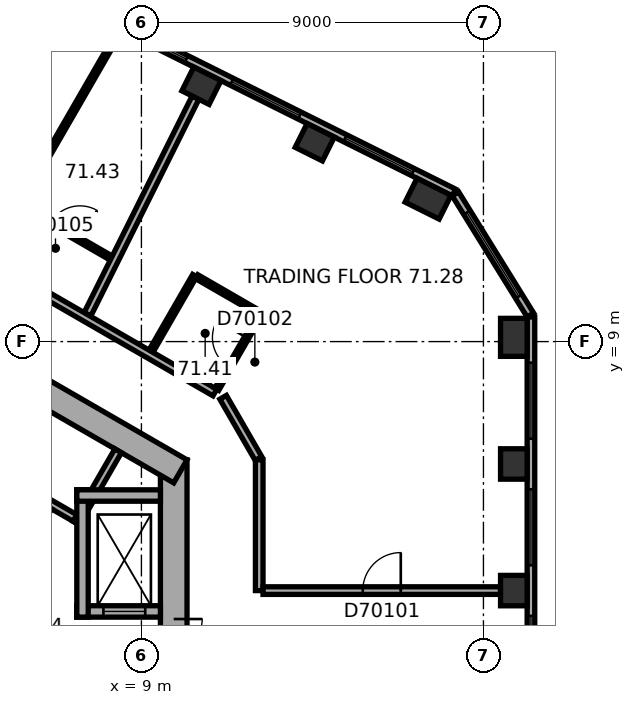
"""IFC4 building model, lengths in metres.
Left out: names, types, materials, properties, quantities, classifications, styles, units other than length and angle.
Written with IfcOpenShell. Run it as: python <this file> out.ifc"""

import sys

from ifc_helpers import new_model, si_unit, direction, frame, frame_2d, origin, origin_2d, place, context, subcontext, project, spatial, rectangle, extrude, element, fill, save


model = new_model("IFC4")
c1 = context("Model", 3, precision=1e-05, world=origin(), true_north=direction((0.0, 1.0)))
c2 = subcontext(c1, "Body", "Model", "MODEL_VIEW")
j1 = project(units=[si_unit("LENGTHUNIT", "METRE"), si_unit("PLANEANGLEUNIT", "RADIAN")], contexts=[c1])
p1 = place(None, origin())
s1 = spatial("IfcSite", under=j1, at=p1, CompositionType="ELEMENT")
p2 = place(p1, origin())
s2 = spatial("IfcBuilding", under=s1, at=p2, CompositionType="ELEMENT")
p3 = place(p2, frame((0.0, 0.0, 289.4)))
s3 = spatial("IfcBuildingStorey", under=s2, at=p3, CompositionType="ELEMENT", Elevation=289.4)
for number, where, z_axis, x_axis in (
    (1, (18.8, 2.448, 0.0), (0.0, 0.0, 1.0), (0.0, 1.0, 0.0)),
    (2, (18.8, 5.78, 0.0), (0.0, 0.0, 1.0), (0.0, 1.0, 0.0)),
):
    element("IfcColumn", number, at=place(p3, frame(where, z_axis=z_axis, x_axis=x_axis)), inside=s3, PredefinedType="COLUMN", context=c2, shape_type="SweptSolid", body=[
        extrude(rectangle(XDim=0.8, YDim=0.7, at=origin_2d()), origin(), (0.0, 0.0, 1.0), 3.7),
    ])
for number, where, z_axis, x_axis in (
    (3, (18.8, 9.112, 0.0), (0.0, 0.0, 1.0), (0.0, 1.0, 0.0)),
    (4, (16.543, 12.759, 0.0), (0.0, 0.0, 1.0), (-0.895, 0.446, 0.0)),
):
    element("IfcColumn", number, at=place(p3, frame(where, z_axis=z_axis, x_axis=x_axis)), inside=s3, PredefinedType="COLUMN", context=c2, shape_type="SweptSolid", body=[
        extrude(rectangle(XDim=1.0, YDim=0.7, at=origin_2d()), origin(), (0.0, 0.0, 1.0), 3.7),
    ])
for number, where, z_axis, x_axis in (
    (5, (13.561, 14.246, 0.0), (0.0, 0.0, 1.0), (-0.895, 0.446, 0.0)),
    (6, (10.58, 15.732, 0.0), (0.0, 0.0, 1.0), (-0.895, 0.446, 0.0)),
):
    element("IfcColumn", number, at=place(p3, frame(where, z_axis=z_axis, x_axis=x_axis)), inside=s3, PredefinedType="COLUMN", context=c2, shape_type="SweptSolid", body=[
        extrude(rectangle(XDim=0.8, YDim=0.7, at=origin_2d()), origin(), (0.0, 0.0, 1.0), 3.7),
    ])
p4 = place(p3, frame((9.85, -5.889, 0.0), z_axis=(0.0, 0.0, 1.0), x_axis=(0.0, 1.0, 0.0)))
e7 = element("IfcWall", 7, at=p4, inside=s3, PredefinedType="SHEAR", context=c2, shape_type="SweptSolid", body=[
    extrude(rectangle(XDim=11.778, YDim=0.7, at=frame_2d((5.889, 0.0))), origin(), (0.0, 0.0, 1.0), 3.7),
])
p5 = place(p4, frame((6.089, 0.0, 0.0)))
e8 = element("IfcOpeningElement", 8, at=p5, cuts=e7, PredefinedType="OPENING", context=c2, shape_type="SweptSolid", body=[
    extrude(rectangle(XDim=1.5, YDim=2.1, at=frame_2d((0.75, 1.05))), frame((0.0, 0.36, 0.0), z_axis=(0.0, -1.0, 0.0), x_axis=(1.0, 0.0, 0.0)), (0.0, 0.0, 1.0), 0.72),
])
p6 = place(p4, frame((2.939, 0.0, 0.0)))
e9 = element("IfcOpeningElement", 9, at=p6, cuts=e7, PredefinedType="OPENING", context=c2, shape_type="SweptSolid", body=[
    extrude(rectangle(XDim=0.9, YDim=2.1, at=frame_2d((0.45, 1.05))), frame((0.0, 0.36, 0.0), z_axis=(0.0, -1.0, 0.0), x_axis=(1.0, 0.0, 0.0)), (0.0, 0.0, 1.0), 0.72),
])
p7 = place(p3, frame((10.025, 5.586, 0.0), z_axis=(0.0, 0.0, 1.0), x_axis=(-0.866026453023, 0.499998182661, 0.0)))
e10 = element("IfcWall", 10, at=p7, inside=s3, PredefinedType="SHEAR", context=c2, shape_type="SweptSolid", body=[
    extrude(rectangle(XDim=11.778, YDim=0.7, at=frame_2d((5.889, 0.0))), origin(), (0.0, 0.0, 1.0), 3.7),
])
p8 = place(p7, frame((5.139, 0.0, 0.0)))
e11 = element("IfcOpeningElement", 11, at=p8, cuts=e10, PredefinedType="OPENING", context=c2, shape_type="SweptSolid", body=[
    extrude(rectangle(XDim=0.9, YDim=2.1, at=frame_2d((0.45, 1.05))), frame((0.0, 0.36, 0.0), z_axis=(0.0, -1.0, 0.0), x_axis=(1.0, 0.0, 0.0)), (0.0, 0.0, 1.0), 0.72),
])
p9 = place(p3, frame((19.25, -8.084, 0.0), z_axis=(0.0, 0.0, 1.0), x_axis=(0.0, 1.0, 0.0)))
e12 = element("IfcWall", 12, at=p9, inside=s3, PredefinedType="STANDARD", context=c2, shape_type="SweptSolid", body=[
    extrude(rectangle(XDim=17.731, YDim=0.2, at=frame_2d((8.866, 0.0))), origin(), (0.0, 0.0, 1.0), 3.7),
])
p10 = place(p9, frame((1.203, 0.0, 0.9)))
e13 = element("IfcOpeningElement", 13, at=p10, cuts=e12, PredefinedType="OPENING", context=c2, shape_type="SweptSolid", body=[
    extrude(rectangle(XDim=2.0, YDim=2.0, at=frame_2d((1.0, 1.0))), frame((0.0, 0.11, 0.0), z_axis=(0.0, -1.0, 0.0), x_axis=(1.0, 0.0, 0.0)), (0.0, 0.0, 1.0), 0.22),
])
p11 = place(p9, frame((4.535, 0.0, 0.9)))
e14 = element("IfcOpeningElement", 14, at=p11, cuts=e12, PredefinedType="OPENING", context=c2, shape_type="SweptSolid", body=[
    extrude(rectangle(XDim=2.0, YDim=2.0, at=frame_2d((1.0, 1.0))), frame((0.0, 0.11, 0.0), z_axis=(0.0, -1.0, 0.0), x_axis=(1.0, 0.0, 0.0)), (0.0, 0.0, 1.0), 0.22),
])
p12 = place(p9, frame((7.866, 0.0, 0.9)))
e15 = element("IfcOpeningElement", 15, at=p12, cuts=e12, PredefinedType="OPENING", context=c2, shape_type="SweptSolid", body=[
    extrude(rectangle(XDim=2.0, YDim=2.0, at=frame_2d((1.0, 1.0))), frame((0.0, 0.11, 0.0), z_axis=(0.0, -1.0, 0.0), x_axis=(1.0, 0.0, 0.0)), (0.0, 0.0, 1.0), 0.22),
])
p13 = place(p9, frame((11.198, 0.0, 0.9)))
e16 = element("IfcOpeningElement", 16, at=p13, cuts=e12, PredefinedType="OPENING", context=c2, shape_type="SweptSolid", body=[
    extrude(rectangle(XDim=2.0, YDim=2.0, at=frame_2d((1.0, 1.0))), frame((0.0, 0.11, 0.0), z_axis=(0.0, -1.0, 0.0), x_axis=(1.0, 0.0, 0.0)), (0.0, 0.0, 1.0), 0.22),
])
p14 = place(p9, frame((14.53, 0.0, 0.9)))
e17 = element("IfcOpeningElement", 17, at=p14, cuts=e12, PredefinedType="OPENING", context=c2, shape_type="SweptSolid", body=[
    extrude(rectangle(XDim=2.0, YDim=2.0, at=frame_2d((1.0, 1.0))), frame((0.0, 0.11, 0.0), z_axis=(0.0, -1.0, 0.0), x_axis=(1.0, 0.0, 0.0)), (0.0, 0.0, 1.0), 0.22),
])
p15 = place(p3, frame((19.235, 9.7, 0.0), z_axis=(0.0, 0.0, 1.0), x_axis=(-0.526233475464, 0.850340125656, 0.0)))
e18 = element("IfcWall", 18, at=p15, inside=s3, PredefinedType="STANDARD", context=c2, shape_type="SweptSolid", body=[
    extrude(rectangle(XDim=3.747, YDim=0.2, at=frame_2d((1.874, 0.0))), origin(), (0.0, 0.0, 1.0), 3.7),
])
p16 = place(p15, frame((0.573, 0.0, 0.9)))
e19 = element("IfcOpeningElement", 19, at=p16, cuts=e18, PredefinedType="OPENING", context=c2, shape_type="SweptSolid", body=[
    extrude(rectangle(XDim=2.6, YDim=2.0, at=frame_2d((1.3, 1.0))), frame((0.0, 0.11, 0.0), z_axis=(0.0, -1.0, 0.0), x_axis=(1.0, 0.0, 0.0)), (0.0, 0.0, 1.0), 0.22),
])
p17 = place(p3, frame((17.223, 12.923, 0.0), z_axis=(0.0, 0.0, 1.0), x_axis=(-0.894930561148, 0.44620543556, 0.0)))
e20 = element("IfcWall", 20, at=p17, inside=s3, PredefinedType="STANDARD", context=c2, shape_type="SweptSolid", body=[
    extrude(rectangle(XDim=17.731, YDim=0.2, at=frame_2d((8.866, 0.0))), origin(), (0.0, 0.0, 1.0), 3.7),
])
p18 = place(p17, frame((1.202, 0.0, 0.9)))
e21 = element("IfcOpeningElement", 21, at=p18, cuts=e20, PredefinedType="OPENING", context=c2, shape_type="SweptSolid", body=[
    extrude(rectangle(XDim=2.0, YDim=2.0, at=frame_2d((1.0, 1.0))), frame((0.0, 0.11, 0.0), z_axis=(0.0, -1.0, 0.0), x_axis=(1.0, 0.0, 0.0)), (0.0, 0.0, 1.0), 0.22),
])
p19 = place(p17, frame((4.533, 0.0, 0.9)))
e22 = element("IfcOpeningElement", 22, at=p19, cuts=e20, PredefinedType="OPENING", context=c2, shape_type="SweptSolid", body=[
    extrude(rectangle(XDim=2.0, YDim=2.0, at=frame_2d((1.0, 1.0))), frame((0.0, 0.11, 0.0), z_axis=(0.0, -1.0, 0.0), x_axis=(1.0, 0.0, 0.0)), (0.0, 0.0, 1.0), 0.22),
])
p20 = place(p17, frame((7.865, 0.0, 0.9)))
e23 = element("IfcOpeningElement", 23, at=p20, cuts=e20, PredefinedType="OPENING", context=c2, shape_type="SweptSolid", body=[
    extrude(rectangle(XDim=2.0, YDim=2.0, at=frame_2d((1.0, 1.0))), frame((0.0, 0.11, 0.0), z_axis=(0.0, -1.0, 0.0), x_axis=(1.0, 0.0, 0.0)), (0.0, 0.0, 1.0), 0.22),
])
p21 = place(p17, frame((11.197, 0.0, 0.9)))
e24 = element("IfcOpeningElement", 24, at=p21, cuts=e20, PredefinedType="OPENING", context=c2, shape_type="SweptSolid", body=[
    extrude(rectangle(XDim=2.0, YDim=2.0, at=frame_2d((1.0, 1.0))), frame((0.0, 0.11, 0.0), z_axis=(0.0, -1.0, 0.0), x_axis=(1.0, 0.0, 0.0)), (0.0, 0.0, 1.0), 0.22),
])
p22 = place(p17, frame((14.528, 0.0, 0.9)))
e25 = element("IfcOpeningElement", 25, at=p22, cuts=e20, PredefinedType="OPENING", context=c2, shape_type="SweptSolid", body=[
    extrude(rectangle(XDim=2.0, YDim=2.0, at=frame_2d((1.0, 1.0))), frame((0.0, 0.11, 0.0), z_axis=(0.0, -1.0, 0.0), x_axis=(1.0, 0.0, 0.0)), (0.0, 0.0, 1.0), 0.22),
])
p23 = place(p3, frame((7.424, 4.259, 0.0), z_axis=(0.0, 0.0, 1.0), x_axis=(-0.866026010844, 0.49999894854, 0.0)))
e26 = element("IfcWall", 26, at=p23, inside=s3, PredefinedType="PARTITIONING", context=c2, shape_type="SweptSolid", body=[
    extrude(rectangle(XDim=8.0, YDim=0.2, at=frame_2d((4.0, 0.0))), origin(), (0.0, 0.0, 1.0), 3.42),
])
p24 = place(p3, frame((7.287, 4.222, 0.0), z_axis=(0.0, 0.0, 1.0), x_axis=(0.499946605688, 0.86605622881, 0.0)))
e27 = element("IfcWall", 27, at=p24, inside=s3, PredefinedType="PARTITIONING", context=c2, shape_type="SweptSolid", body=[
    extrude(rectangle(XDim=2.2, YDim=0.2, at=frame_2d((1.1, 0.0))), origin(), (0.0, 0.0, 1.0), 3.42),
])
p25 = place(p3, frame((7.3, 1.9, 0.0), z_axis=(0.0, 0.0, 1.0), x_axis=(1.0, 0.0, 0.0)))
e28 = element("IfcWall", 28, at=p25, inside=s3, PredefinedType="SHEAR", context=c2, shape_type="SweptSolid", body=[
    extrude(rectangle(XDim=2.2, YDim=0.3, at=frame_2d((1.1, 0.0))), origin(), (0.0, 0.0, 1.0), 3.42),
])
p26 = place(p25, frame((0.7, 0.0, 0.0)))
e29 = element("IfcOpeningElement", 29, at=p26, cuts=e28, PredefinedType="OPENING", context=c2, shape_type="SweptSolid", body=[
    extrude(rectangle(XDim=1.1, YDim=2.1, at=frame_2d((0.55, 1.05))), frame((0.0, 0.16, 0.0), z_axis=(0.0, -1.0, 0.0), x_axis=(1.0, 0.0, 0.0)), (0.0, 0.0, 1.0), 0.32),
])
p27 = place(p3, frame((7.45, 1.75, 0.0), z_axis=(0.0, 0.0, 1.0), x_axis=(0.0, 1.0, 0.0)))
e30 = element("IfcWall", 30, at=p27, inside=s3, PredefinedType="SHEAR", context=c2, shape_type="SweptSolid", body=[
    extrude(rectangle(XDim=3.35, YDim=0.3, at=frame_2d((1.675, 0.0))), origin(), (0.0, 0.0, 1.0), 3.42),
])
p28 = place(p3, frame((7.3, 4.95, 0.0), z_axis=(0.0, 0.0, 1.0), x_axis=(1.0, 0.0, 0.0)))
e31 = element("IfcWall", 31, at=p28, inside=s3, PredefinedType="SHEAR", context=c2, shape_type="SweptSolid", body=[
    extrude(rectangle(XDim=2.2, YDim=0.3, at=frame_2d((1.1, 0.0))), origin(), (0.0, 0.0, 1.0), 3.42),
])
p29 = place(p3, frame((8.207, 11.197, 0.0), z_axis=(0.0, 0.0, 1.0), x_axis=(-0.866030514021, 0.499991148707, 0.0)))
e32 = element("IfcWall", 32, at=p29, inside=s3, PredefinedType="PARTITIONING", context=c2, shape_type="SweptSolid", body=[
    extrude(rectangle(XDim=6.476, YDim=0.12, at=frame_2d((3.238, 0.0))), origin(), (0.0, 0.0, 1.0), 3.42),
])
p30 = place(p29, frame((5.011, 0.0, 0.0)))
e33 = element("IfcOpeningElement", 33, at=p30, cuts=e32, PredefinedType="OPENING", context=c2, shape_type="SweptSolid", body=[
    extrude(rectangle(XDim=1.0, YDim=2.1, at=frame_2d((0.5, 1.05))), frame((0.0, 0.07, 0.0), z_axis=(0.0, -1.0, 0.0), x_axis=(1.0, 0.0, 0.0)), (0.0, 0.0, 1.0), 0.14),
])
p31 = place(p29, frame((0.95, 0.0, 0.0)))
e34 = element("IfcOpeningElement", 34, at=p31, cuts=e32, PredefinedType="OPENING", context=c2, shape_type="SweptSolid", body=[
    extrude(rectangle(XDim=0.9, YDim=2.1, at=frame_2d((0.45, 1.05))), frame((0.0, 0.07, 0.0), z_axis=(0.0, -1.0, 0.0), x_axis=(1.0, 0.0, 0.0)), (0.0, 0.0, 1.0), 0.14),
])
p32 = place(p29, frame((3.223, 0.0, 0.0)))
e35 = element("IfcOpeningElement", 35, at=p32, cuts=e32, PredefinedType="OPENING", context=c2, shape_type="SweptSolid", body=[
    extrude(rectangle(XDim=0.9, YDim=2.1, at=frame_2d((0.45, 1.05))), frame((0.0, 0.07, 0.0), z_axis=(0.0, -1.0, 0.0), x_axis=(1.0, 0.0, 0.0)), (0.0, 0.0, 1.0), 0.14),
])
p33 = place(p3, frame((8.435, 17.192, 0.0), z_axis=(0.0, 0.0, 1.0), x_axis=(-0.499982949935, -0.86603524742, 0.0)))
e36 = element("IfcWall", 36, at=p33, inside=s3, PredefinedType="PARTITIONING", context=c2, shape_type="SweptSolid", body=[
    extrude(rectangle(XDim=5.246, YDim=0.12, at=frame_2d((2.623, 0.0))), origin(), (0.0, 0.0, 1.0), 3.42),
])
p34 = place(p3, frame((9.251, 8.746, 0.0), z_axis=(0.0, 0.0, 1.0), x_axis=(0.499998129301, 0.86602648383, 0.0)))
e37 = element("IfcWall", 37, at=p34, inside=s3, PredefinedType="PARTITIONING", context=c2, shape_type="SweptSolid", body=[
    extrude(rectangle(XDim=2.3, YDim=0.12, at=frame_2d((1.15, 0.0))), origin(), (0.0, 0.0, 1.0), 3.42),
])
p35 = place(p3, frame((10.423, 15.419, 0.0), z_axis=(0.0, 0.0, 1.0), x_axis=(-0.446201045829, -0.89493274982, 0.0)))
e38 = element("IfcWall", 38, at=p35, inside=s3, PredefinedType="PARTITIONING", context=c2, shape_type="SweptSolid", body=[
    extrude(rectangle(XDim=6.367, YDim=0.2, at=frame_2d((3.184, 0.0))), origin(), (0.0, 0.0, 1.0), 2.87),
])
p36 = place(p3, frame((10.453, 10.708, 0.0), z_axis=(0.0, 0.0, 1.0), x_axis=(0.865988597889, -0.500063744262, 0.0)))
e39 = element("IfcWall", 39, at=p36, inside=s3, PredefinedType="PARTITIONING", context=c2, shape_type="SweptSolid", body=[
    extrude(rectangle(XDim=1.94, YDim=0.12, at=frame_2d((0.97, 0.0))), origin(), (0.0, 0.0, 1.0), 3.42),
])
p37 = place(p3, frame((10.934, 7.659, 0.0), z_axis=(0.0, 0.0, 1.0), x_axis=(-0.866030932647, 0.499990423607, 0.0)))
e40 = element("IfcWall", 40, at=p37, inside=s3, PredefinedType="PARTITIONING", context=c2, shape_type="SweptSolid", body=[
    extrude(rectangle(XDim=11.488, YDim=0.2, at=frame_2d((5.744, 0.0))), origin(), (0.0, 0.0, 1.0), 3.42),
])
p38 = place(p37, frame((6.764, 0.0, 0.0)))
e41 = element("IfcOpeningElement", 41, at=p38, cuts=e40, PredefinedType="OPENING", context=c2, shape_type="SweptSolid", body=[
    extrude(rectangle(XDim=1.0, YDim=2.1, at=frame_2d((0.5, 1.05))), frame((0.0, 0.11, 0.0), z_axis=(0.0, -1.0, 0.0), x_axis=(1.0, 0.0, 0.0)), (0.0, 0.0, 1.0), 0.22),
])
p39 = place(p3, frame((12.08, 5.924, 0.0), z_axis=(0.0, 0.0, 1.0), x_axis=(-0.500063286585, 0.865988862174, 0.0)))
e42 = element("IfcWall", 42, at=p39, inside=s3, PredefinedType="PARTITIONING", context=c2, shape_type="SweptSolid", body=[
    extrude(rectangle(XDim=1.86, YDim=0.2, at=frame_2d((0.93, 0.0))), origin(), (0.0, 0.0, 1.0), 3.42),
])
p40 = place(p3, frame((12.1, 2.448, 0.0), z_axis=(0.0, 0.0, 1.0), x_axis=(0.0, 1.0, 0.0)))
e43 = element("IfcWall", 43, at=p40, inside=s3, PredefinedType="PARTITIONING", context=c2, shape_type="SweptSolid", body=[
    extrude(rectangle(XDim=3.441, YDim=0.2, at=frame_2d((1.72, 0.0))), origin(), (0.0, 0.0, 1.0), 3.42),
])
p41 = place(p3, frame((12.104, 9.686, 0.0), z_axis=(0.0, 0.0, 1.0), x_axis=(-0.500077830873, -0.865980463445, 0.0)))
e44 = element("IfcWall", 44, at=p41, inside=s3, PredefinedType="PARTITIONING", context=c2, shape_type="SweptSolid", body=[
    extrude(rectangle(XDim=2.24, YDim=0.12, at=frame_2d((1.12, 0.0))), origin(), (0.0, 0.0, 1.0), 3.42),
])
p42 = place(p41, frame((0.67, 0.0, 0.0)))
e45 = element("IfcOpeningElement", 45, at=p42, cuts=e44, PredefinedType="OPENING", context=c2, shape_type="SweptSolid", body=[
    extrude(rectangle(XDim=0.9, YDim=2.1, at=frame_2d((0.45, 1.05))), frame((0.0, 0.07, 0.0), z_axis=(0.0, -1.0, 0.0), x_axis=(1.0, 0.0, 0.0)), (0.0, 0.0, 1.0), 0.14),
])
p43 = place(p3, frame((18.45, 2.448, 0.0), z_axis=(0.0, 0.0, 1.0), x_axis=(-1.0, 0.0, 0.0)))
e46 = element("IfcWall", 46, at=p43, inside=s3, PredefinedType="PARTITIONING", context=c2, shape_type="SweptSolid", body=[
    extrude(rectangle(XDim=6.25, YDim=0.2, at=frame_2d((3.125, 0.0))), origin(), (0.0, 0.0, 1.0), 3.42),
])
p44 = place(p43, frame((2.625, 0.0, 0.0)))
e47 = element("IfcOpeningElement", 47, at=p44, cuts=e46, PredefinedType="OPENING", context=c2, shape_type="SweptSolid", body=[
    extrude(rectangle(XDim=1.0, YDim=2.1, at=frame_2d((0.5, 1.05))), frame((0.0, 0.11, 0.0), z_axis=(0.0, -1.0, 0.0), x_axis=(1.0, 0.0, 0.0)), (0.0, 0.0, 1.0), 0.22),
])
p45 = place(p12, origin())
e48 = element("IfcWindow", 48, at=p45, inside=s3, PartitioningType="SINGLE_PANEL", PredefinedType="WINDOW", context=c2, shape_type="SweptSolid", body=[
    extrude(rectangle(XDim=2.0, YDim=2.0, at=frame_2d((1.0, 1.0))), frame((0.0, 0.03, 0.0), z_axis=(0.0, -1.0, 0.0), x_axis=(1.0, 0.0, 0.0)), (0.0, 0.0, 1.0), 0.06),
])
fill(e15, e48)
p46 = place(p13, origin())
e49 = element("IfcWindow", 49, at=p46, inside=s3, PartitioningType="SINGLE_PANEL", PredefinedType="WINDOW", context=c2, shape_type="SweptSolid", body=[
    extrude(rectangle(XDim=2.0, YDim=2.0, at=frame_2d((1.0, 1.0))), frame((0.0, 0.03, 0.0), z_axis=(0.0, -1.0, 0.0), x_axis=(1.0, 0.0, 0.0)), (0.0, 0.0, 1.0), 0.06),
])
fill(e16, e49)
p47 = place(p14, origin())
e50 = element("IfcWindow", 50, at=p47, inside=s3, PartitioningType="SINGLE_PANEL", PredefinedType="WINDOW", context=c2, shape_type="SweptSolid", body=[
    extrude(rectangle(XDim=2.0, YDim=2.0, at=frame_2d((1.0, 1.0))), frame((0.0, 0.03, 0.0), z_axis=(0.0, -1.0, 0.0), x_axis=(1.0, 0.0, 0.0)), (0.0, 0.0, 1.0), 0.06),
])
fill(e17, e50)
p48 = place(p16, origin())
e51 = element("IfcWindow", 51, at=p48, inside=s3, PartitioningType="SINGLE_PANEL", PredefinedType="WINDOW", context=c2, shape_type="SweptSolid", body=[
    extrude(rectangle(XDim=2.6, YDim=2.0, at=frame_2d((1.3, 1.0))), frame((0.0, 0.03, 0.0), z_axis=(0.0, -1.0, 0.0), x_axis=(1.0, 0.0, 0.0)), (0.0, 0.0, 1.0), 0.06),
])
fill(e19, e51)
p49 = place(p18, origin())
e52 = element("IfcWindow", 52, at=p49, inside=s3, PartitioningType="SINGLE_PANEL", PredefinedType="WINDOW", context=c2, shape_type="SweptSolid", body=[
    extrude(rectangle(XDim=2.0, YDim=2.0, at=frame_2d((1.0, 1.0))), frame((0.0, 0.03, 0.0), z_axis=(0.0, -1.0, 0.0), x_axis=(1.0, 0.0, 0.0)), (0.0, 0.0, 1.0), 0.06),
])
fill(e21, e52)
p50 = place(p19, origin())
e53 = element("IfcWindow", 53, at=p50, inside=s3, PartitioningType="SINGLE_PANEL", PredefinedType="WINDOW", context=c2, shape_type="SweptSolid", body=[
    extrude(rectangle(XDim=2.0, YDim=2.0, at=frame_2d((1.0, 1.0))), frame((0.0, 0.03, 0.0), z_axis=(0.0, -1.0, 0.0), x_axis=(1.0, 0.0, 0.0)), (0.0, 0.0, 1.0), 0.06),
])
fill(e22, e53)
p51 = place(p20, origin())
e54 = element("IfcWindow", 54, at=p51, inside=s3, PartitioningType="SINGLE_PANEL", PredefinedType="WINDOW", context=c2, shape_type="SweptSolid", body=[
    extrude(rectangle(XDim=2.0, YDim=2.0, at=frame_2d((1.0, 1.0))), frame((0.0, 0.03, 0.0), z_axis=(0.0, -1.0, 0.0), x_axis=(1.0, 0.0, 0.0)), (0.0, 0.0, 1.0), 0.06),
])
fill(e23, e54)
p52 = place(p5, origin())
e55 = element("IfcDoor", 55, at=p52, inside=s3, OperationType="DOUBLE_DOOR_SINGLE_SWING", PredefinedType="DOOR", context=c2, shape_type="SweptSolid", body=[
    extrude(rectangle(XDim=1.5, YDim=2.1, at=frame_2d((0.75, 1.05))), frame((0.0, 0.025, 0.0), z_axis=(0.0, -1.0, 0.0), x_axis=(1.0, 0.0, 0.0)), (0.0, 0.0, 1.0), 0.05),
])
fill(e8, e55)
p53 = place(p26, origin())
e56 = element("IfcDoor", 56, at=p53, inside=s3, OperationType="DOUBLE_DOOR_SLIDING", PredefinedType="DOOR", context=c2, shape_type="SweptSolid", body=[
    extrude(rectangle(XDim=1.1, YDim=2.1, at=frame_2d((0.55, 1.05))), frame((0.0, 0.025, 0.0), z_axis=(0.0, -1.0, 0.0), x_axis=(1.0, 0.0, 0.0)), (0.0, 0.0, 1.0), 0.05),
])
fill(e29, e56)
p54 = place(p44, origin())
e57 = element("IfcDoor", 57, at=p54, inside=s3, OperationType="SINGLE_SWING_LEFT", PredefinedType="DOOR", context=c2, shape_type="SweptSolid", body=[
    extrude(rectangle(XDim=1.0, YDim=2.1, at=frame_2d((0.5, 1.05))), frame((0.0, 0.025, 0.0), z_axis=(0.0, -1.0, 0.0), x_axis=(1.0, 0.0, 0.0)), (0.0, 0.0, 1.0), 0.05),
])
fill(e47, e57)
p55 = place(p42, origin())
e58 = element("IfcDoor", 58, at=p55, inside=s3, OperationType="SINGLE_SWING_LEFT", PredefinedType="DOOR", context=c2, shape_type="SweptSolid", body=[
    extrude(rectangle(XDim=0.9, YDim=2.1, at=frame_2d((0.45, 1.05))), frame((0.0, 0.025, 0.0), z_axis=(0.0, -1.0, 0.0), x_axis=(1.0, 0.0, 0.0)), (0.0, 0.0, 1.0), 0.05),
])
fill(e45, e58)
p56 = place(p31, origin())
e59 = element("IfcDoor", 59, at=p56, inside=s3, OperationType="SINGLE_SWING_LEFT", PredefinedType="DOOR", context=c2, shape_type="SweptSolid", body=[
    extrude(rectangle(XDim=0.9, YDim=2.1, at=frame_2d((0.45, 1.05))), frame((0.0, 0.025, 0.0), z_axis=(0.0, -1.0, 0.0), x_axis=(1.0, 0.0, 0.0)), (0.0, 0.0, 1.0), 0.05),
])
fill(e34, e59)
save(model, sys.argv[1])
